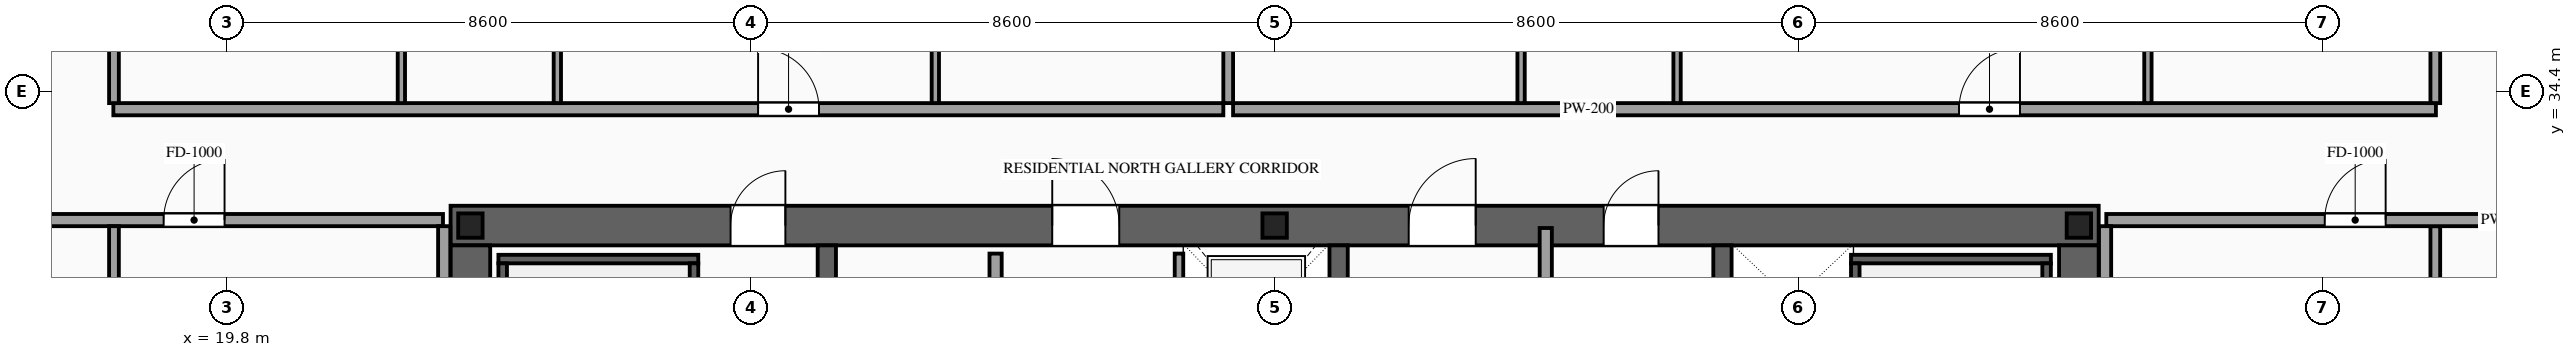
"""IFC4 building model, lengths in metres.
Left out: names, types, materials, properties, quantities, classifications, styles, units other than length and angle.
Written with IfcOpenShell. Run it as: python <this file> out.ifc"""

import sys

from ifc_helpers import new_model, si_unit, direction, frame, frame_2d, origin, origin_2d, place, context, subcontext, project, spatial, rectangle, i_section, extrude, source, transform, mapped, element, fill, save


model = new_model("IFC4")
c1 = context("Model", 3, precision=1e-05, world=origin(), true_north=direction((0.0, 1.0)))
c2 = subcontext(c1, "Body", "Model", "MODEL_VIEW")
j1 = project(units=[si_unit("LENGTHUNIT", "METRE"), si_unit("PLANEANGLEUNIT", "RADIAN")], contexts=[c1])
p1 = place(None, origin())
s1 = spatial("IfcSite", under=j1, at=p1, CompositionType="ELEMENT")
p2 = place(p1, origin())
s2 = spatial("IfcBuilding", under=s1, at=p2, CompositionType="ELEMENT")
p3 = place(p2, frame((0.0, 0.0, 216.0)))
s3 = spatial("IfcBuildingStorey", under=s2, at=p3, CompositionType="ELEMENT", Elevation=216.0)
p4 = place(p3, frame((23.475, 32.2, 0.0), z_axis=(0.0, 0.0, 1.0), x_axis=(1.0, 0.0, 0.0)))
e1 = element("IfcWall", 1, at=p4, inside=s3, PredefinedType="SHEAR", context=c2, shape_type="SweptSolid", body=[
    extrude(rectangle(XDim=27.05, YDim=0.65, at=frame_2d((13.525, 0.0))), origin(), (0.0, 0.0, 1.0), 3.5),
])
p5 = place(p4, frame((4.595, 0.0, 0.0)))
e2 = element("IfcOpeningElement", 2, at=p5, cuts=e1, PredefinedType="OPENING", context=c2, shape_type="SweptSolid", body=[
    extrude(rectangle(XDim=0.9, YDim=2.15, at=frame_2d((0.45, 1.075))), frame((0.0, 0.34, 0.0), z_axis=(0.0, -1.0, 0.0), x_axis=(1.0, 0.0, 0.0)), (0.0, 0.0, 1.0), 0.68),
])
p6 = place(p4, frame((9.875, 0.0, 0.0)))
e3 = element("IfcOpeningElement", 3, at=p6, cuts=e1, PredefinedType="OPENING", context=c2, shape_type="SweptSolid", body=[
    extrude(rectangle(XDim=1.1, YDim=2.2, at=frame_2d((0.55, 1.1))), frame((0.0, 0.34, 0.0), z_axis=(0.0, -1.0, 0.0), x_axis=(1.0, 0.0, 0.0)), (0.0, 0.0, 1.0), 0.68),
])
p7 = place(p4, frame((15.725, 0.0, 0.0)))
e4 = element("IfcOpeningElement", 4, at=p7, cuts=e1, PredefinedType="OPENING", context=c2, shape_type="SweptSolid", body=[
    extrude(rectangle(XDim=1.1, YDim=2.2, at=frame_2d((0.55, 1.1))), frame((0.0, 0.34, 0.0), z_axis=(0.0, -1.0, 0.0), x_axis=(1.0, 0.0, 0.0)), (0.0, 0.0, 1.0), 0.68),
])
p8 = place(p4, frame((18.925, 0.0, 0.0)))
e5 = element("IfcOpeningElement", 5, at=p8, cuts=e1, PredefinedType="OPENING", context=c2, shape_type="SweptSolid", body=[
    extrude(rectangle(XDim=0.9, YDim=2.15, at=frame_2d((0.45, 1.075))), frame((0.0, 0.34, 0.0), z_axis=(0.0, -1.0, 0.0), x_axis=(1.0, 0.0, 0.0)), (0.0, 0.0, 1.0), 0.68),
])
m1 = source(origin(), c2, "Body", "SweptSolid", [
    extrude(rectangle(XDim=12.15, YDim=0.65, at=frame_2d((6.075, 0.0))), origin(), (0.0, 0.0, 1.0), 3.5),
])
for number, where, z_axis, x_axis in (
    (6, (23.8, 19.725, 0.0), (0.0, 0.0, 1.0), (0.0, 1.0, 0.0)),
    (7, (50.2, 19.725, 0.0), (0.0, 0.0, 1.0), (0.0, 1.0, 0.0)),
):
    element("IfcWall", number, at=place(p3, frame(where, z_axis=z_axis, x_axis=x_axis)), inside=s3, PredefinedType="SHEAR", context=c2, shape_type="MappedRepresentation", body=[
        mapped(m1, transform((0.0, 0.0, 0.0), scale=1.0)),
    ])
m2 = source(origin(), c2, "Body", "SweptSolid", [
    extrude(rectangle(XDim=12.15, YDim=0.3, at=frame_2d((6.075, 0.0))), origin(), (0.0, 0.0, 1.0), 3.5),
])
for number, where, z_axis, x_axis in (
    (8, (29.65, 19.725, 0.0), (0.0, 0.0, 1.0), (0.0, 1.0, 0.0)),
    (9, (38.05, 19.725, 0.0), (0.0, 0.0, 1.0), (0.0, 1.0, 0.0)),
    (10, (44.35, 19.725, 0.0), (0.0, 0.0, 1.0), (0.0, 1.0, 0.0)),
):
    element("IfcWall", number, at=place(p3, frame(where, z_axis=z_axis, x_axis=x_axis)), inside=s3, PredefinedType="SOLIDWALL", context=c2, shape_type="MappedRepresentation", body=[
        mapped(m2, transform((0.0, 0.0, 0.0), scale=1.0)),
    ])
m3 = source(origin(), c2, "Body", "SweptSolid", [
    extrude(i_section(OverallWidth=0.4, OverallDepth=0.4, WebThickness=0.013, FlangeThickness=0.021, at=origin_2d()), origin(), (0.0, 0.0, 1.0), 3.5),
])
for number, where, z_axis, x_axis in (
    (11, (23.8, 32.2, 0.0), (0.0, 0.0, 1.0), (1.0, 0.0, 0.0)),
    (12, (37.0, 32.2, 0.0), (0.0, 0.0, 1.0), (1.0, 0.0, 0.0)),
    (13, (50.2, 32.2, 0.0), (0.0, 0.0, 1.0), (1.0, 0.0, 0.0)),
):
    element("IfcColumn", number, at=place(p3, frame(where, z_axis=z_axis, x_axis=x_axis)), inside=s3, PredefinedType="COLUMN", context=c2, shape_type="MappedRepresentation", body=[
        mapped(m3, transform((0.0, 0.0, 0.0), scale=1.0)),
    ])
p9 = place(p3, frame((35.43, 29.4, 0.0), z_axis=(0.0, 0.0, 1.0), x_axis=(0.0, 1.0, 0.0)))
e14 = element("IfcWall", 14, at=p9, inside=s3, PredefinedType="SOLIDWALL", context=c2, shape_type="SweptSolid", body=[
    extrude(rectangle(XDim=2.34, YDim=0.14, at=frame_2d((1.17, 0.0))), origin(), (0.0, 0.0, 1.0), 3.22),
])
p10 = place(p9, frame((0.62, 0.0, 0.0)))
e15 = element("IfcOpeningElement", 15, at=p10, cuts=e14, PredefinedType="OPENING", context=c2, shape_type="SweptSolid", body=[
    extrude(rectangle(XDim=1.1, YDim=2.2, at=frame_2d((0.55, 1.1))), frame((0.0, 0.085, 0.0), z_axis=(0.0, -1.0, 0.0), x_axis=(1.0, 0.0, 0.0)), (0.0, 0.0, 1.0), 0.17),
])
m4 = source(origin(), c2, "Body", "SweptSolid", [
    extrude(rectangle(XDim=3.28, YDim=0.14, at=frame_2d((1.64, 0.0))), origin(), (0.0, 0.0, 1.0), 3.22),
])
p11 = place(p3, frame((24.26, 31.65, 0.0), z_axis=(0.0, 0.0, 1.0), x_axis=(1.0, 0.0, 0.0)))
e16 = element("IfcWall", 16, at=p11, inside=s3, PredefinedType="SOLIDWALL", context=c2, shape_type="MappedRepresentation", body=[
    mapped(m4, transform((0.0, 0.0, 0.0), scale=1.0)),
])
m5 = source(origin(), c2, "Body", "SweptSolid", [
    extrude(rectangle(XDim=8.94, YDim=0.14, at=frame_2d((4.47, 0.0))), origin(), (0.0, 0.0, 1.0), 3.22),
])
for number, where, z_axis, x_axis in (
    (17, (24.33, 22.64, 0.0), (0.0, 0.0, 1.0), (0.0, 1.0, 0.0)),
    (18, (27.47, 22.64, 0.0), (0.0, 0.0, 1.0), (0.0, 1.0, 0.0)),
):
    element("IfcWall", number, at=place(p3, frame(where, z_axis=z_axis, x_axis=x_axis)), inside=s3, PredefinedType="SOLIDWALL", context=c2, shape_type="MappedRepresentation", body=[
        mapped(m5, transform((0.0, 0.0, 0.0), scale=1.0)),
    ])
p12 = place(p3, frame((46.46, 31.65, 0.0), z_axis=(0.0, 0.0, 1.0), x_axis=(1.0, 0.0, 0.0)))
e19 = element("IfcWall", 19, at=p12, inside=s3, PredefinedType="SOLIDWALL", context=c2, shape_type="MappedRepresentation", body=[
    mapped(m4, transform((0.0, 0.0, 0.0), scale=1.0)),
])
for number, where, z_axis, x_axis in (
    (20, (46.53, 22.64, 0.0), (0.0, 0.0, 1.0), (0.0, 1.0, 0.0)),
    (21, (49.67, 22.64, 0.0), (0.0, 0.0, 1.0), (0.0, 1.0, 0.0)),
):
    element("IfcWall", number, at=place(p3, frame(where, z_axis=z_axis, x_axis=x_axis)), inside=s3, PredefinedType="SOLIDWALL", context=c2, shape_type="MappedRepresentation", body=[
        mapped(m5, transform((0.0, 0.0, 0.0), scale=1.0)),
    ])
p13 = place(p3, frame((32.42, 24.05, 0.0), z_axis=(0.0, 0.0, 1.0), x_axis=(0.0, 1.0, 0.0)))
e22 = element("IfcWall", 22, at=p13, inside=s3, PredefinedType="PARTITIONING", context=c2, shape_type="SweptSolid", body=[
    extrude(rectangle(XDim=7.69, YDim=0.2, at=frame_2d((3.845, 0.0))), origin(), (0.0, 0.0, 1.0), 3.22),
])
p14 = place(p13, frame((3.395, 0.0, 0.0)))
e23 = element("IfcOpeningElement", 23, at=p14, cuts=e22, PredefinedType="OPENING", context=c2, shape_type="SweptSolid", body=[
    extrude(rectangle(XDim=0.9, YDim=2.15, at=frame_2d((0.45, 1.075))), frame((0.0, 0.115, 0.0), z_axis=(0.0, -1.0, 0.0), x_axis=(1.0, 0.0, 0.0)), (0.0, 0.0, 1.0), 0.23),
])
m6 = source(origin(), c2, "Body", "SweptSolid", [
    extrude(rectangle(XDim=5.96, YDim=0.2, at=frame_2d((2.98, 0.0))), origin(), (0.0, 0.0, 1.0), 3.22),
])
p15 = place(p3, frame((41.45, 26.2, 0.0), z_axis=(0.0, 0.0, 1.0), x_axis=(0.0, 1.0, 0.0)))
e24 = element("IfcWall", 24, at=p15, inside=s3, PredefinedType="PARTITIONING", context=c2, shape_type="MappedRepresentation", body=[
    mapped(m6, transform((0.0, 0.0, 0.0), scale=1.0)),
])
p16 = place(p3, frame((17.94, 34.11, 0.0), z_axis=(0.0, 0.0, 1.0), x_axis=(1.0, 0.0, 0.0)))
e25 = element("IfcWall", 25, at=p16, inside=s3, PredefinedType="PARTITIONING", context=c2, shape_type="SweptSolid", body=[
    extrude(rectangle(XDim=18.218, YDim=0.2, at=frame_2d((9.109, 0.0))), origin(), (0.0, 0.0, 1.0), 3.22),
])
p17 = place(p16, frame((10.582, 0.0, 0.0)))
e26 = element("IfcOpeningElement", 26, at=p17, cuts=e25, PredefinedType="OPENING", context=c2, shape_type="SweptSolid", body=[
    extrude(rectangle(XDim=1.0, YDim=2.2, at=frame_2d((0.5, 1.1))), frame((0.0, 0.115, 0.0), z_axis=(0.0, -1.0, 0.0), x_axis=(1.0, 0.0, 0.0)), (0.0, 0.0, 1.0), 0.23),
])
m7 = source(origin(), c2, "Body", "SweptSolid", [
    extrude(rectangle(XDim=13.54, YDim=0.16, at=frame_2d((6.77, 0.0))), origin(), (0.0, 0.0, 1.0), 3.22),
])
p18 = place(p3, frame((36.238, 34.21, 0.0), z_axis=(0.0, 0.0, 1.0), x_axis=(0.0, 1.0, 0.0)))
e27 = element("IfcWall", 27, at=p18, inside=s3, PredefinedType="PARTITIONING", context=c2, shape_type="MappedRepresentation", body=[
    mapped(m7, transform((0.0, 0.0, 0.0), scale=1.0)),
])
m8 = source(origin(), c2, "Body", "SweptSolid", [
    extrude(rectangle(XDim=5.61, YDim=0.12, at=frame_2d((2.805, 0.0))), origin(), (0.0, 0.0, 1.0), 1.615),
])
p19 = place(p3, frame((22.667, 34.21, 0.0), z_axis=(0.0, 0.0, 1.0), x_axis=(0.0, 1.0, 0.0)))
e28 = element("IfcWall", 28, at=p19, inside=s3, PredefinedType="PARTITIONING", context=c2, shape_type="MappedRepresentation", body=[
    mapped(m8, transform((0.0, 0.0, 0.0), scale=1.0)),
])
p20 = place(p3, frame((25.227, 34.21, 0.0), z_axis=(0.0, 0.0, 1.0), x_axis=(0.0, 1.0, 0.0)))
e29 = element("IfcWall", 29, at=p20, inside=s3, PredefinedType="PARTITIONING", context=c2, shape_type="SweptSolid", body=[
    extrude(rectangle(XDim=5.61, YDim=0.12, at=frame_2d((2.805, 0.0))), origin(), (0.0, 0.0, 1.0), 3.22),
])
p21 = place(p20, frame((2.38, 0.0, 0.0)))
e30 = element("IfcOpeningElement", 30, at=p21, cuts=e29, PredefinedType="OPENING", context=c2, shape_type="SweptSolid", body=[
    extrude(rectangle(XDim=0.85, YDim=2.1, at=frame_2d((0.425, 1.05))), frame((0.0, 0.075, 0.0), z_axis=(0.0, -1.0, 0.0), x_axis=(1.0, 0.0, 0.0)), (0.0, 0.0, 1.0), 0.15),
])
m9 = source(origin(), c2, "Body", "SweptSolid", [
    extrude(rectangle(XDim=5.61, YDim=0.12, at=frame_2d((2.805, 0.0))), origin(), (0.0, 0.0, 1.0), 3.22),
])
p22 = place(p3, frame((31.431, 34.21, 0.0), z_axis=(0.0, 0.0, 1.0), x_axis=(0.0, 1.0, 0.0)))
e31 = element("IfcWall", 31, at=p22, inside=s3, PredefinedType="PARTITIONING", context=c2, shape_type="MappedRepresentation", body=[
    mapped(m9, transform((0.0, 0.0, 0.0), scale=1.0)),
])
p23 = place(p3, frame((36.318, 34.11, 0.0), z_axis=(0.0, 0.0, 1.0), x_axis=(1.0, 0.0, 0.0)))
e32 = element("IfcWall", 32, at=p23, inside=s3, PredefinedType="PARTITIONING", context=c2, shape_type="SweptSolid", body=[
    extrude(rectangle(XDim=19.742, YDim=0.2, at=frame_2d((9.871, 0.0))), origin(), (0.0, 0.0, 1.0), 3.22),
])
p24 = place(p23, frame((11.915, 0.0, 0.0)))
e33 = element("IfcOpeningElement", 33, at=p24, cuts=e32, PredefinedType="OPENING", context=c2, shape_type="SweptSolid", body=[
    extrude(rectangle(XDim=1.0, YDim=2.2, at=frame_2d((0.5, 1.1))), frame((0.0, 0.115, 0.0), z_axis=(0.0, -1.0, 0.0), x_axis=(1.0, 0.0, 0.0)), (0.0, 0.0, 1.0), 0.23),
])
m10 = source(origin(), c2, "Body", "SweptSolid", [
    extrude(rectangle(XDim=13.39, YDim=0.16, at=frame_2d((6.695, 0.0))), origin(), (0.0, 0.0, 1.0), 3.22),
])
for number, where, z_axis, x_axis in (
    (34, (17.95, 34.21, 0.0), (0.0, 0.0, 1.0), (0.0, 1.0, 0.0)),
    (35, (56.05, 34.21, 0.0), (0.0, 0.0, 1.0), (0.0, 1.0, 0.0)),
):
    element("IfcWall", number, at=place(p3, frame(where, z_axis=z_axis, x_axis=x_axis)), inside=s3, PredefinedType="PARTITIONING", context=c2, shape_type="MappedRepresentation", body=[
        mapped(m10, transform((0.0, 0.0, 0.0), scale=1.0)),
    ])
p25 = place(p3, frame((41.045, 34.21, 0.0), z_axis=(0.0, 0.0, 1.0), x_axis=(0.0, 1.0, 0.0)))
e36 = element("IfcWall", 36, at=p25, inside=s3, PredefinedType="PARTITIONING", context=c2, shape_type="MappedRepresentation", body=[
    mapped(m9, transform((0.0, 0.0, 0.0), scale=1.0)),
])
p26 = place(p3, frame((43.605, 34.21, 0.0), z_axis=(0.0, 0.0, 1.0), x_axis=(0.0, 1.0, 0.0)))
e37 = element("IfcWall", 37, at=p26, inside=s3, PredefinedType="PARTITIONING", context=c2, shape_type="SweptSolid", body=[
    extrude(rectangle(XDim=5.61, YDim=0.12, at=frame_2d((2.805, 0.0))), origin(), (0.0, 0.0, 1.0), 3.22),
])
p27 = place(p26, frame((2.38, 0.0, 0.0)))
e38 = element("IfcOpeningElement", 38, at=p27, cuts=e37, PredefinedType="OPENING", context=c2, shape_type="SweptSolid", body=[
    extrude(rectangle(XDim=0.85, YDim=2.1, at=frame_2d((0.425, 1.05))), frame((0.0, 0.075, 0.0), z_axis=(0.0, -1.0, 0.0), x_axis=(1.0, 0.0, 0.0)), (0.0, 0.0, 1.0), 0.15),
])
p28 = place(p3, frame((51.333, 34.21, 0.0), z_axis=(0.0, 0.0, 1.0), x_axis=(0.0, 1.0, 0.0)))
e39 = element("IfcWall", 39, at=p28, inside=s3, PredefinedType="PARTITIONING", context=c2, shape_type="MappedRepresentation", body=[
    mapped(m8, transform((0.0, 0.0, 0.0), scale=1.0)),
])
p29 = place(p3, frame((15.05, 32.29, 0.0), z_axis=(0.0, 0.0, 1.0), x_axis=(1.0, 0.0, 0.0)))
e40 = element("IfcWall", 40, at=p29, inside=s3, PredefinedType="PARTITIONING", context=c2, shape_type="SweptSolid", body=[
    extrude(rectangle(XDim=8.3, YDim=0.2, at=frame_2d((4.15, 0.0))), origin(), (0.0, 0.0, 1.0), 3.22),
])
p30 = place(p29, frame((3.715, 0.0, 0.0)))
e41 = element("IfcOpeningElement", 41, at=p30, cuts=e40, PredefinedType="OPENING", context=c2, shape_type="SweptSolid", body=[
    extrude(rectangle(XDim=1.0, YDim=2.2, at=frame_2d((0.5, 1.1))), frame((0.0, 0.115, 0.0), z_axis=(0.0, -1.0, 0.0), x_axis=(1.0, 0.0, 0.0)), (0.0, 0.0, 1.0), 0.23),
])
m11 = source(origin(), c2, "Body", "SweptSolid", [
    extrude(rectangle(XDim=28.19, YDim=0.16, at=frame_2d((14.095, 0.0))), origin(), (0.0, 0.0, 1.0), 3.22),
])
for number, where, z_axis, x_axis in (
    (42, (17.95, 4.0, 0.0), (0.0, 0.0, 1.0), (0.0, 1.0, 0.0)),
    (43, (56.05, 4.0, 0.0), (0.0, 0.0, 1.0), (0.0, 1.0, 0.0)),
):
    element("IfcWall", number, at=place(p3, frame(where, z_axis=z_axis, x_axis=x_axis)), inside=s3, PredefinedType="PARTITIONING", context=c2, shape_type="MappedRepresentation", body=[
        mapped(m11, transform((0.0, 0.0, 0.0), scale=1.0)),
    ])
m12 = source(origin(), c2, "Body", "SweptSolid", [
    extrude(rectangle(XDim=6.29, YDim=0.2, at=frame_2d((3.145, 0.0))), origin(), (0.0, 0.0, 1.0), 3.22),
])
p31 = place(p3, frame((23.37, 25.9, 0.0), z_axis=(0.0, 0.0, 1.0), x_axis=(0.0, 1.0, 0.0)))
e44 = element("IfcWall", 44, at=p31, inside=s3, PredefinedType="PARTITIONING", context=c2, shape_type="MappedRepresentation", body=[
    mapped(m12, transform((0.0, 0.0, 0.0), scale=1.0)),
])
p32 = place(p3, frame((50.65, 32.29, 0.0), z_axis=(0.0, 0.0, 1.0), x_axis=(1.0, 0.0, 0.0)))
e45 = element("IfcWall", 45, at=p32, inside=s3, PredefinedType="PARTITIONING", context=c2, shape_type="SweptSolid", body=[
    extrude(rectangle(XDim=8.3, YDim=0.2, at=frame_2d((4.15, 0.0))), origin(), (0.0, 0.0, 1.0), 3.22),
])
p33 = place(p32, frame((3.585, 0.0, 0.0)))
e46 = element("IfcOpeningElement", 46, at=p33, cuts=e45, PredefinedType="OPENING", context=c2, shape_type="SweptSolid", body=[
    extrude(rectangle(XDim=1.0, YDim=2.2, at=frame_2d((0.5, 1.1))), frame((0.0, 0.115, 0.0), z_axis=(0.0, -1.0, 0.0), x_axis=(1.0, 0.0, 0.0)), (0.0, 0.0, 1.0), 0.23),
])
p34 = place(p3, frame((50.63, 25.9, 0.0), z_axis=(0.0, 0.0, 1.0), x_axis=(0.0, 1.0, 0.0)))
e47 = element("IfcWall", 47, at=p34, inside=s3, PredefinedType="PARTITIONING", context=c2, shape_type="MappedRepresentation", body=[
    mapped(m12, transform((0.0, 0.0, 0.0), scale=1.0)),
])
m13 = source(origin(), c2, "Body", "SweptSolid", [
    extrude(rectangle(XDim=0.9, YDim=2.15, at=frame_2d((0.45, 1.075))), frame((0.0, 0.025, 0.0), z_axis=(0.0, -1.0, 0.0), x_axis=(1.0, 0.0, 0.0)), (0.0, 0.0, 1.0), 0.05),
])
p35 = place(p5, origin())
e48 = element("IfcDoor", 48, at=p35, inside=s3, OperationType="SINGLE_SWING_RIGHT", PredefinedType="DOOR", context=c2, shape_type="MappedRepresentation", body=[
    mapped(m13, transform((0.0, 0.0, 0.0), scale=1.0)),
])
fill(e2, e48)
m14 = source(origin(), c2, "Body", "SweptSolid", [
    extrude(rectangle(XDim=1.1, YDim=2.2, at=frame_2d((0.55, 1.1))), frame((0.0, 0.025, 0.0), z_axis=(0.0, -1.0, 0.0), x_axis=(1.0, 0.0, 0.0)), (0.0, 0.0, 1.0), 0.05),
])
p36 = place(p6, origin())
e49 = element("IfcDoor", 49, at=p36, inside=s3, OperationType="SINGLE_SWING_LEFT", PredefinedType="DOOR", context=c2, shape_type="MappedRepresentation", body=[
    mapped(m14, transform((0.0, 0.0, 0.0), scale=1.0)),
])
fill(e3, e49)
p37 = place(p7, origin())
e50 = element("IfcDoor", 50, at=p37, inside=s3, OperationType="SINGLE_SWING_RIGHT", PredefinedType="DOOR", context=c2, shape_type="MappedRepresentation", body=[
    mapped(m14, transform((0.0, 0.0, 0.0), scale=1.0)),
])
fill(e4, e50)
p38 = place(p8, origin())
e51 = element("IfcDoor", 51, at=p38, inside=s3, OperationType="SINGLE_SWING_RIGHT", PredefinedType="DOOR", context=c2, shape_type="MappedRepresentation", body=[
    mapped(m13, transform((0.0, 0.0, 0.0), scale=1.0)),
])
fill(e5, e51)
m15 = source(origin(), c2, "Body", "SweptSolid", [
    extrude(rectangle(XDim=1.0, YDim=2.2, at=frame_2d((0.5, 1.1))), frame((0.0, 0.025, 0.0), z_axis=(0.0, -1.0, 0.0), x_axis=(1.0, 0.0, 0.0)), (0.0, 0.0, 1.0), 0.05),
])
p39 = place(p17, origin())
e52 = element("IfcDoor", 52, at=p39, inside=s3, OperationType="SINGLE_SWING_LEFT", PredefinedType="DOOR", context=c2, shape_type="MappedRepresentation", body=[
    mapped(m15, transform((0.0, 0.0, 0.0), scale=1.0)),
])
fill(e26, e52)
p40 = place(p24, origin())
e53 = element("IfcDoor", 53, at=p40, inside=s3, OperationType="SINGLE_SWING_RIGHT", PredefinedType="DOOR", context=c2, shape_type="MappedRepresentation", body=[
    mapped(m15, transform((0.0, 0.0, 0.0), scale=1.0)),
])
fill(e33, e53)
p41 = place(p30, origin())
e54 = element("IfcDoor", 54, at=p41, inside=s3, OperationType="SINGLE_SWING_RIGHT", PredefinedType="DOOR", context=c2, shape_type="MappedRepresentation", body=[
    mapped(m15, transform((0.0, 0.0, 0.0), scale=1.0)),
])
fill(e41, e54)
p42 = place(p33, origin())
e55 = element("IfcDoor", 55, at=p42, inside=s3, OperationType="SINGLE_SWING_RIGHT", PredefinedType="DOOR", context=c2, shape_type="MappedRepresentation", body=[
    mapped(m15, transform((0.0, 0.0, 0.0), scale=1.0)),
])
fill(e46, e55)
save(model, sys.argv[1])
